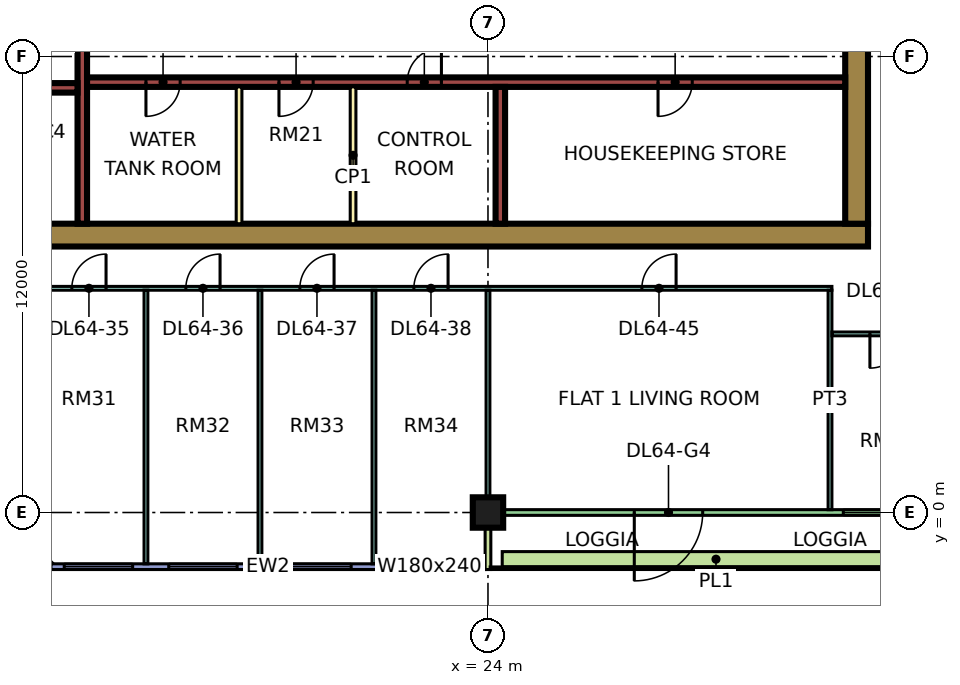
"""IFC4 building model, lengths in metres.
Left out: names, types, materials, properties, quantities, classifications, styles, units other than length and angle.
Written with IfcOpenShell. Run it as: python <this file> out.ifc"""

import sys

from ifc_helpers import new_model, si_unit, direction, frame, frame_2d, origin, origin_2d, place, context, subcontext, project, spatial, rectangle, extrude, element, fill, save


model = new_model("IFC4")
c1 = context("Model", 3, precision=1e-05, world=origin(), true_north=direction((0.0, 1.0)))
c2 = subcontext(c1, "Body", "Model", "MODEL_VIEW")
j1 = project(units=[si_unit("LENGTHUNIT", "METRE"), si_unit("PLANEANGLEUNIT", "RADIAN")], contexts=[c1])
p1 = place(None, origin())
s1 = spatial("IfcSite", under=j1, at=p1, CompositionType="ELEMENT")
p2 = place(p1, origin())
s2 = spatial("IfcBuilding", under=s1, at=p2, CompositionType="ELEMENT")
p3 = place(p2, frame((0.0, 0.0, 277.15)))
s3 = spatial("IfcBuildingStorey", under=s2, at=p3, CompositionType="ELEMENT", Elevation=277.15)
p4 = place(p3, frame((24.0, 0.0, 0.0), z_axis=(0.0, 0.0, 1.0), x_axis=(1.0, 0.0, 0.0)))
e1 = element("IfcColumn", 1, at=p4, inside=s3, PredefinedType="COLUMN", context=c2, shape_type="SweptSolid", body=[
    extrude(rectangle(XDim=0.8, YDim=0.8, at=origin_2d()), origin(), (0.0, 0.0, 1.0), 3.75),
])
p5 = place(p3, frame((9.0, 7.3, 0.0), z_axis=(0.0, 0.0, 1.0), x_axis=(1.0, 0.0, 0.0)))
e2 = element("IfcWall", 2, at=p5, inside=s3, PredefinedType="SHEAR", context=c2, shape_type="SweptSolid", body=[
    extrude(rectangle(XDim=25.0, YDim=0.6, at=frame_2d((12.5, 0.0))), origin(), (0.0, 0.0, 1.0), 3.75),
])
p6 = place(p3, frame((33.7, 7.6, 0.0), z_axis=(0.0, 0.0, 1.0), x_axis=(0.0, 1.0, 0.0)))
e3 = element("IfcWall", 3, at=p6, inside=s3, PredefinedType="SHEAR", context=c2, shape_type="SweptSolid", body=[
    extrude(rectangle(XDim=11.8, YDim=0.6, at=frame_2d((5.9, 0.0))), origin(), (0.0, 0.0, 1.0), 3.75),
])
p7 = place(p6, frame((5.6, 0.0, 0.0)))
e4 = element("IfcOpeningElement", 4, at=p7, cuts=e3, PredefinedType="OPENING", context=c2, shape_type="SweptSolid", body=[
    extrude(rectangle(XDim=1.8, YDim=2.4, at=frame_2d((0.9, 1.2))), frame((0.0, 0.31, 0.0), z_axis=(0.0, -1.0, 0.0), x_axis=(1.0, 0.0, 0.0)), (0.0, 0.0, 1.0), 0.62),
])
p8 = place(p3, frame((13.325, 7.6, 0.0), z_axis=(0.0, 0.0, 1.0), x_axis=(0.0, 1.0, 0.0)))
e5 = element("IfcWall", 5, at=p8, inside=s3, PredefinedType="SHEAR", context=c2, shape_type="SweptSolid", body=[
    extrude(rectangle(XDim=11.8, YDim=0.25, at=frame_2d((5.9, 0.0))), origin(), (0.0, 0.0, 1.0), 3.75),
])
p9 = place(p3, frame((13.45, 11.325, 0.0), z_axis=(0.0, 0.0, 1.0), x_axis=(1.0, 0.0, 0.0)))
e6 = element("IfcWall", 6, at=p9, inside=s3, PredefinedType="SHEAR", context=c2, shape_type="SweptSolid", body=[
    extrude(rectangle(XDim=19.95, YDim=0.25, at=frame_2d((9.975, 0.0))), origin(), (0.0, 0.0, 1.0), 3.75),
])
p10 = place(p9, frame((1.55, 0.0, 0.0)))
e7 = element("IfcOpeningElement", 7, at=p10, cuts=e6, PredefinedType="OPENING", context=c2, shape_type="SweptSolid", body=[
    extrude(rectangle(XDim=0.9, YDim=2.1, at=frame_2d((0.45, 1.05))), frame((0.0, 0.135, 0.0), z_axis=(0.0, -1.0, 0.0), x_axis=(1.0, 0.0, 0.0)), (0.0, 0.0, 1.0), 0.27),
])
p11 = place(p9, frame((5.05, 0.0, 0.0)))
e8 = element("IfcOpeningElement", 8, at=p11, cuts=e6, PredefinedType="OPENING", context=c2, shape_type="SweptSolid", body=[
    extrude(rectangle(XDim=0.9, YDim=2.1, at=frame_2d((0.45, 1.05))), frame((0.0, 0.135, 0.0), z_axis=(0.0, -1.0, 0.0), x_axis=(1.0, 0.0, 0.0)), (0.0, 0.0, 1.0), 0.27),
])
p12 = place(p9, frame((8.425, 0.0, 0.0)))
e9 = element("IfcOpeningElement", 9, at=p12, cuts=e6, PredefinedType="OPENING", context=c2, shape_type="SweptSolid", body=[
    extrude(rectangle(XDim=0.9, YDim=2.1, at=frame_2d((0.45, 1.05))), frame((0.0, 0.135, 0.0), z_axis=(0.0, -1.0, 0.0), x_axis=(1.0, 0.0, 0.0)), (0.0, 0.0, 1.0), 0.27),
])
p13 = place(p9, frame((15.025, 0.0, 0.0)))
e10 = element("IfcOpeningElement", 10, at=p13, cuts=e6, PredefinedType="OPENING", context=c2, shape_type="SweptSolid", body=[
    extrude(rectangle(XDim=0.9, YDim=2.1, at=frame_2d((0.45, 1.05))), frame((0.0, 0.135, 0.0), z_axis=(0.0, -1.0, 0.0), x_axis=(1.0, 0.0, 0.0)), (0.0, 0.0, 1.0), 0.27),
])
p14 = place(p3, frame((10.2, 11.175, 0.0), z_axis=(0.0, 0.0, 1.0), x_axis=(1.0, 0.0, 0.0)))
e11 = element("IfcWall", 11, at=p14, inside=s3, PredefinedType="SHEAR", context=c2, shape_type="SweptSolid", body=[
    extrude(rectangle(XDim=3.0, YDim=0.25, at=frame_2d((1.5, 0.0))), origin(), (0.0, 0.0, 1.0), 3.75),
])
p15 = place(p3, frame((24.325, 7.6, 0.0), z_axis=(0.0, 0.0, 1.0), x_axis=(0.0, 1.0, 0.0)))
e12 = element("IfcWall", 12, at=p15, inside=s3, PredefinedType="SHEAR", context=c2, shape_type="SweptSolid", body=[
    extrude(rectangle(XDim=3.6, YDim=0.25, at=frame_2d((1.8, 0.0))), origin(), (0.0, 0.0, 1.0), 3.75),
])
p16 = place(p3, frame((-1.447, 12.553, 0.0), z_axis=(0.0, 0.0, 1.0), x_axis=(0.707106781187, -0.707106781187, 0.0)))
e13 = element("IfcWall", 13, at=p16, inside=s3, PredefinedType="SOLIDWALL", context=c2, shape_type="SweptSolid", body=[
    extrude(rectangle(XDim=19.799, YDim=0.15, at=frame_2d((9.899, 0.0))), origin(), (0.0, 0.0, 1.0), 3.35),
])
p17 = place(p16, frame((2.212, 0.0, 0.45)))
e14 = element("IfcOpeningElement", 14, at=p17, cuts=e13, PredefinedType="OPENING", context=c2, shape_type="SweptSolid", body=[
    extrude(rectangle(XDim=3.0, YDim=2.4, at=frame_2d((1.5, 1.2))), frame((0.0, 0.085, 0.0), z_axis=(0.0, -1.0, 0.0), x_axis=(1.0, 0.0, 0.0)), (0.0, 0.0, 1.0), 0.17),
])
p18 = place(p16, frame((10.216, 0.0, 0.45)))
e15 = element("IfcOpeningElement", 15, at=p18, cuts=e13, PredefinedType="OPENING", context=c2, shape_type="SweptSolid", body=[
    extrude(rectangle(XDim=3.0, YDim=2.4, at=frame_2d((1.5, 1.2))), frame((0.0, 0.085, 0.0), z_axis=(0.0, -1.0, 0.0), x_axis=(1.0, 0.0, 0.0)), (0.0, 0.0, 1.0), 0.17),
])
p19 = place(p3, frame((12.5, -1.425, 0.0), z_axis=(0.0, 0.0, 1.0), x_axis=(1.0, 0.0, 0.0)))
e16 = element("IfcWall", 16, at=p19, inside=s3, PredefinedType="SOLIDWALL", context=c2, shape_type="SweptSolid", body=[
    extrude(rectangle(XDim=11.425, YDim=0.15, at=frame_2d((5.712, 0.0))), origin(), (0.0, 0.0, 1.0), 3.35),
])
p20 = place(p19, frame((0.35, 0.0, 0.45)))
e17 = element("IfcOpeningElement", 17, at=p20, cuts=e16, PredefinedType="OPENING", context=c2, shape_type="SweptSolid", body=[
    extrude(rectangle(XDim=1.8, YDim=2.4, at=frame_2d((0.9, 1.2))), frame((0.0, 0.085, 0.0), z_axis=(0.0, -1.0, 0.0), x_axis=(1.0, 0.0, 0.0)), (0.0, 0.0, 1.0), 0.17),
])
p21 = place(p19, frame((3.1, 0.0, 0.45)))
e18 = element("IfcOpeningElement", 18, at=p21, cuts=e16, PredefinedType="OPENING", context=c2, shape_type="SweptSolid", body=[
    extrude(rectangle(XDim=1.8, YDim=2.4, at=frame_2d((0.9, 1.2))), frame((0.0, 0.085, 0.0), z_axis=(0.0, -1.0, 0.0), x_axis=(1.0, 0.0, 0.0)), (0.0, 0.0, 1.0), 0.17),
])
p22 = place(p19, frame((6.1, 0.0, 0.45)))
e19 = element("IfcOpeningElement", 19, at=p22, cuts=e16, PredefinedType="OPENING", context=c2, shape_type="SweptSolid", body=[
    extrude(rectangle(XDim=1.8, YDim=2.4, at=frame_2d((0.9, 1.2))), frame((0.0, 0.085, 0.0), z_axis=(0.0, -1.0, 0.0), x_axis=(1.0, 0.0, 0.0)), (0.0, 0.0, 1.0), 0.17),
])
p23 = place(p19, frame((9.062, 0.0, 0.45)))
e20 = element("IfcOpeningElement", 20, at=p23, cuts=e16, PredefinedType="OPENING", context=c2, shape_type="SweptSolid", body=[
    extrude(rectangle(XDim=1.8, YDim=2.4, at=frame_2d((0.9, 1.2))), frame((0.0, 0.085, 0.0), z_axis=(0.0, -1.0, 0.0), x_axis=(1.0, 0.0, 0.0)), (0.0, 0.0, 1.0), 0.17),
])
p24 = place(p3, frame((24.075, 0.0, 0.0), z_axis=(0.0, 0.0, 1.0), x_axis=(1.0, 0.0, 0.0)))
e21 = element("IfcWall", 21, at=p24, inside=s3, PredefinedType="SOLIDWALL", context=c2, shape_type="SweptSolid", body=[
    extrude(rectangle(XDim=11.85, YDim=0.15, at=frame_2d((5.925, 0.0))), origin(), (0.0, 0.0, 1.0), 3.35),
])
p25 = place(p24, frame((3.775, 0.0, 0.0)))
e22 = element("IfcOpeningElement", 22, at=p25, cuts=e21, PredefinedType="OPENING", context=c2, shape_type="SweptSolid", body=[
    extrude(rectangle(XDim=1.8, YDim=2.4, at=frame_2d((0.9, 1.2))), frame((0.0, 0.085, 0.0), z_axis=(0.0, -1.0, 0.0), x_axis=(1.0, 0.0, 0.0)), (0.0, 0.0, 1.0), 0.17),
])
p26 = place(p24, frame((9.275, 0.0, 0.45)))
e23 = element("IfcOpeningElement", 23, at=p26, cuts=e21, PredefinedType="OPENING", context=c2, shape_type="SweptSolid", body=[
    extrude(rectangle(XDim=1.8, YDim=2.4, at=frame_2d((0.9, 1.2))), frame((0.0, 0.085, 0.0), z_axis=(0.0, -1.0, 0.0), x_axis=(1.0, 0.0, 0.0)), (0.0, 0.0, 1.0), 0.17),
])
p27 = place(p3, frame((24.0, -1.5, 0.0), z_axis=(0.0, 0.0, 1.0), x_axis=(0.0, 1.0, 0.0)))
e24 = element("IfcWall", 24, at=p27, inside=s3, PredefinedType="SOLIDWALL", context=c2, shape_type="SweptSolid", body=[
    extrude(rectangle(XDim=1.5, YDim=0.15, at=frame_2d((0.75, 0.0))), origin(), (0.0, 0.0, 1.0), 3.35),
])
p28 = place(p3, frame((24.375, -1.229, 0.0), z_axis=(0.0, 0.0, 1.0), x_axis=(1.0, 0.0, 0.0)))
e25 = element("IfcWall", 25, at=p28, inside=s3, PredefinedType="SOLIDWALL", context=c2, shape_type="SweptSolid", body=[
    extrude(rectangle(XDim=11.25, YDim=0.4, at=frame_2d((5.625, 0.0))), origin(), (0.0, 0.0, 1.0), 0.7),
])
for number, where, z_axis, x_axis in (
    (26, (17.45, 7.6, 0.0), (0.0, 0.0, 1.0), (0.0, 1.0, 0.0)),
    (27, (20.45, 7.6, 0.0), (0.0, 0.0, 1.0), (0.0, 1.0, 0.0)),
):
    element("IfcWall", number, at=place(p3, frame(where, z_axis=z_axis, x_axis=x_axis)), inside=s3, PredefinedType="PARTITIONING", context=c2, shape_type="SweptSolid", body=[
        extrude(rectangle(XDim=3.6, YDim=0.15, at=frame_2d((1.8, 0.0))), origin(), (0.0, 0.0, 1.0), 3.35),
    ])
p29 = place(p3, frame((11.95, 5.9, 0.0), z_axis=(0.0, 0.0, 1.0), x_axis=(1.0, 0.0, 0.0)))
e28 = element("IfcWall", 28, at=p29, inside=s3, PredefinedType="PARTITIONING", context=c2, shape_type="SweptSolid", body=[
    extrude(rectangle(XDim=21.1, YDim=0.1, at=frame_2d((10.55, 0.0))), origin(), (0.0, 0.0, 1.0), 3.35),
])
p30 = place(p29, frame((1.1, 0.0, 0.0)))
e29 = element("IfcOpeningElement", 29, at=p30, cuts=e28, PredefinedType="OPENING", context=c2, shape_type="SweptSolid", body=[
    extrude(rectangle(XDim=0.9, YDim=2.1, at=frame_2d((0.45, 1.05))), frame((0.0, 0.06, 0.0), z_axis=(0.0, -1.0, 0.0), x_axis=(1.0, 0.0, 0.0)), (0.0, 0.0, 1.0), 0.12),
])
p31 = place(p29, frame((4.1, 0.0, 0.0)))
e30 = element("IfcOpeningElement", 30, at=p31, cuts=e28, PredefinedType="OPENING", context=c2, shape_type="SweptSolid", body=[
    extrude(rectangle(XDim=0.9, YDim=2.1, at=frame_2d((0.45, 1.05))), frame((0.0, 0.06, 0.0), z_axis=(0.0, -1.0, 0.0), x_axis=(1.0, 0.0, 0.0)), (0.0, 0.0, 1.0), 0.12),
])
p32 = place(p29, frame((7.1, 0.0, 0.0)))
e31 = element("IfcOpeningElement", 31, at=p32, cuts=e28, PredefinedType="OPENING", context=c2, shape_type="SweptSolid", body=[
    extrude(rectangle(XDim=0.9, YDim=2.1, at=frame_2d((0.45, 1.05))), frame((0.0, 0.06, 0.0), z_axis=(0.0, -1.0, 0.0), x_axis=(1.0, 0.0, 0.0)), (0.0, 0.0, 1.0), 0.12),
])
p33 = place(p29, frame((10.1, 0.0, 0.0)))
e32 = element("IfcOpeningElement", 32, at=p33, cuts=e28, PredefinedType="OPENING", context=c2, shape_type="SweptSolid", body=[
    extrude(rectangle(XDim=0.9, YDim=2.1, at=frame_2d((0.45, 1.05))), frame((0.0, 0.06, 0.0), z_axis=(0.0, -1.0, 0.0), x_axis=(1.0, 0.0, 0.0)), (0.0, 0.0, 1.0), 0.12),
])
p34 = place(p29, frame((16.1, 0.0, 0.0)))
e33 = element("IfcOpeningElement", 33, at=p34, cuts=e28, PredefinedType="OPENING", context=c2, shape_type="SweptSolid", body=[
    extrude(rectangle(XDim=0.9, YDim=2.1, at=frame_2d((0.45, 1.05))), frame((0.0, 0.06, 0.0), z_axis=(0.0, -1.0, 0.0), x_axis=(1.0, 0.0, 0.0)), (0.0, 0.0, 1.0), 0.12),
])
for number, where, z_axis, x_axis in (
    (34, (15.0, -1.351, 0.0), (0.0, 0.0, 1.0), (0.0, 1.0, 0.0)),
    (35, (18.0, -1.351, 0.0), (0.0, 0.0, 1.0), (0.0, 1.0, 0.0)),
    (36, (21.0, -1.351, 0.0), (0.0, 0.0, 1.0), (0.0, 1.0, 0.0)),
):
    element("IfcWall", number, at=place(p3, frame(where, z_axis=z_axis, x_axis=x_axis)), inside=s3, PredefinedType="PARTITIONING", context=c2, shape_type="SweptSolid", body=[
        extrude(rectangle(XDim=7.201, YDim=0.1, at=frame_2d((3.601, 0.0))), origin(), (0.0, 0.0, 1.0), 3.35),
    ])
p35 = place(p3, frame((24.0, 0.0, 0.0), z_axis=(0.0, 0.0, 1.0), x_axis=(0.0, 1.0, 0.0)))
e37 = element("IfcWall", 37, at=p35, inside=s3, PredefinedType="PARTITIONING", context=c2, shape_type="SweptSolid", body=[
    extrude(rectangle(XDim=5.85, YDim=0.1, at=frame_2d((2.925, 0.0))), origin(), (0.0, 0.0, 1.0), 3.35),
])
p36 = place(p3, frame((33.0, 0.074, 0.0), z_axis=(0.0, 0.0, 1.0), x_axis=(0.0, 1.0, 0.0)))
e38 = element("IfcWall", 38, at=p36, inside=s3, PredefinedType="PARTITIONING", context=c2, shape_type="SweptSolid", body=[
    extrude(rectangle(XDim=5.776, YDim=0.1, at=frame_2d((2.888, 0.0))), origin(), (0.0, 0.0, 1.0), 3.35),
])
p37 = place(p3, frame((33.05, 4.7, 0.0), z_axis=(0.0, 0.0, 1.0), x_axis=(1.0, 0.0, 0.0)))
e39 = element("IfcWall", 39, at=p37, inside=s3, PredefinedType="PARTITIONING", context=c2, shape_type="SweptSolid", body=[
    extrude(rectangle(XDim=14.85, YDim=0.1, at=frame_2d((7.425, 0.0))), origin(), (0.0, 0.0, 1.0), 3.35),
])
p38 = place(p37, frame((1.0, 0.0, 0.0)))
e40 = element("IfcOpeningElement", 40, at=p38, cuts=e39, PredefinedType="OPENING", context=c2, shape_type="SweptSolid", body=[
    extrude(rectangle(XDim=0.9, YDim=2.1, at=frame_2d((0.45, 1.05))), frame((0.0, 0.06, 0.0), z_axis=(0.0, -1.0, 0.0), x_axis=(1.0, 0.0, 0.0)), (0.0, 0.0, 1.0), 0.12),
])
p39 = place(p37, frame((4.0, 0.0, 0.0)))
e41 = element("IfcOpeningElement", 41, at=p39, cuts=e39, PredefinedType="OPENING", context=c2, shape_type="SweptSolid", body=[
    extrude(rectangle(XDim=0.9, YDim=2.1, at=frame_2d((0.45, 1.05))), frame((0.0, 0.06, 0.0), z_axis=(0.0, -1.0, 0.0), x_axis=(1.0, 0.0, 0.0)), (0.0, 0.0, 1.0), 0.12),
])
p40 = place(p37, frame((10.0, 0.0, 0.0)))
e42 = element("IfcOpeningElement", 42, at=p40, cuts=e39, PredefinedType="OPENING", context=c2, shape_type="SweptSolid", body=[
    extrude(rectangle(XDim=0.9, YDim=2.1, at=frame_2d((0.45, 1.05))), frame((0.0, 0.06, 0.0), z_axis=(0.0, -1.0, 0.0), x_axis=(1.0, 0.0, 0.0)), (0.0, 0.0, 1.0), 0.12),
])
p41 = place(p20, origin())
e43 = element("IfcWindow", 43, at=p41, inside=s3, PartitioningType="SINGLE_PANEL", PredefinedType="WINDOW", context=c2, shape_type="SweptSolid", body=[
    extrude(rectangle(XDim=1.8, YDim=2.4, at=frame_2d((0.9, 1.2))), frame((0.0, 0.03, 0.0), z_axis=(0.0, -1.0, 0.0), x_axis=(1.0, 0.0, 0.0)), (0.0, 0.0, 1.0), 0.06),
])
fill(e17, e43)
p42 = place(p21, origin())
e44 = element("IfcWindow", 44, at=p42, inside=s3, PartitioningType="SINGLE_PANEL", PredefinedType="WINDOW", context=c2, shape_type="SweptSolid", body=[
    extrude(rectangle(XDim=1.8, YDim=2.4, at=frame_2d((0.9, 1.2))), frame((0.0, 0.03, 0.0), z_axis=(0.0, -1.0, 0.0), x_axis=(1.0, 0.0, 0.0)), (0.0, 0.0, 1.0), 0.06),
])
fill(e18, e44)
p43 = place(p22, origin())
e45 = element("IfcWindow", 45, at=p43, inside=s3, PartitioningType="SINGLE_PANEL", PredefinedType="WINDOW", context=c2, shape_type="SweptSolid", body=[
    extrude(rectangle(XDim=1.8, YDim=2.4, at=frame_2d((0.9, 1.2))), frame((0.0, 0.03, 0.0), z_axis=(0.0, -1.0, 0.0), x_axis=(1.0, 0.0, 0.0)), (0.0, 0.0, 1.0), 0.06),
])
fill(e19, e45)
p44 = place(p23, origin())
e46 = element("IfcWindow", 46, at=p44, inside=s3, PartitioningType="SINGLE_PANEL", PredefinedType="WINDOW", context=c2, shape_type="SweptSolid", body=[
    extrude(rectangle(XDim=1.8, YDim=2.4, at=frame_2d((0.9, 1.2))), frame((0.0, 0.03, 0.0), z_axis=(0.0, -1.0, 0.0), x_axis=(1.0, 0.0, 0.0)), (0.0, 0.0, 1.0), 0.06),
])
fill(e20, e46)
p45 = place(p25, frame((1.8, 0.0, 0.0), z_axis=(0.0, 0.0, 1.0), x_axis=(-1.0, 0.0, 0.0)))
e47 = element("IfcDoor", 47, at=p45, inside=s3, OperationType="DOUBLE_DOOR_SINGLE_SWING", PredefinedType="DOOR", context=c2, shape_type="SweptSolid", body=[
    extrude(rectangle(XDim=1.8, YDim=2.4, at=frame_2d((0.9, 1.2))), frame((0.0, 0.025, 0.0), z_axis=(0.0, -1.0, 0.0), x_axis=(1.0, 0.0, 0.0)), (0.0, 0.0, 1.0), 0.05),
])
fill(e22, e47)
p46 = place(p26, origin())
e48 = element("IfcWindow", 48, at=p46, inside=s3, PartitioningType="SINGLE_PANEL", PredefinedType="WINDOW", context=c2, shape_type="SweptSolid", body=[
    extrude(rectangle(XDim=1.8, YDim=2.4, at=frame_2d((0.9, 1.2))), frame((0.0, 0.03, 0.0), z_axis=(0.0, -1.0, 0.0), x_axis=(1.0, 0.0, 0.0)), (0.0, 0.0, 1.0), 0.06),
])
fill(e23, e48)
p47 = place(p10, frame((0.9, 0.0, 0.0), z_axis=(0.0, 0.0, 1.0), x_axis=(-1.0, 0.0, 0.0)))
e49 = element("IfcDoor", 49, at=p47, inside=s3, OperationType="SINGLE_SWING_LEFT", PredefinedType="DOOR", context=c2, shape_type="SweptSolid", body=[
    extrude(rectangle(XDim=0.9, YDim=2.1, at=frame_2d((0.45, 1.05))), frame((0.0, 0.025, 0.0), z_axis=(0.0, -1.0, 0.0), x_axis=(1.0, 0.0, 0.0)), (0.0, 0.0, 1.0), 0.05),
])
fill(e7, e49)
p48 = place(p11, frame((0.9, 0.0, 0.0), z_axis=(0.0, 0.0, 1.0), x_axis=(-1.0, 0.0, 0.0)))
e50 = element("IfcDoor", 50, at=p48, inside=s3, OperationType="SINGLE_SWING_LEFT", PredefinedType="DOOR", context=c2, shape_type="SweptSolid", body=[
    extrude(rectangle(XDim=0.9, YDim=2.1, at=frame_2d((0.45, 1.05))), frame((0.0, 0.025, 0.0), z_axis=(0.0, -1.0, 0.0), x_axis=(1.0, 0.0, 0.0)), (0.0, 0.0, 1.0), 0.05),
])
fill(e8, e50)
p49 = place(p12, frame((0.9, 0.0, 0.0), z_axis=(0.0, 0.0, 1.0), x_axis=(-1.0, 0.0, 0.0)))
e51 = element("IfcDoor", 51, at=p49, inside=s3, OperationType="SINGLE_SWING_RIGHT", PredefinedType="DOOR", context=c2, shape_type="SweptSolid", body=[
    extrude(rectangle(XDim=0.9, YDim=2.1, at=frame_2d((0.45, 1.05))), frame((0.0, 0.025, 0.0), z_axis=(0.0, -1.0, 0.0), x_axis=(1.0, 0.0, 0.0)), (0.0, 0.0, 1.0), 0.05),
])
fill(e9, e51)
p50 = place(p13, frame((0.9, 0.0, 0.0), z_axis=(0.0, 0.0, 1.0), x_axis=(-1.0, 0.0, 0.0)))
e52 = element("IfcDoor", 52, at=p50, inside=s3, OperationType="SINGLE_SWING_LEFT", PredefinedType="DOOR", context=c2, shape_type="SweptSolid", body=[
    extrude(rectangle(XDim=0.9, YDim=2.1, at=frame_2d((0.45, 1.05))), frame((0.0, 0.025, 0.0), z_axis=(0.0, -1.0, 0.0), x_axis=(1.0, 0.0, 0.0)), (0.0, 0.0, 1.0), 0.05),
])
fill(e10, e52)
p51 = place(p30, frame((0.9, 0.0, 0.0), z_axis=(0.0, 0.0, 1.0), x_axis=(-1.0, 0.0, 0.0)))
e53 = element("IfcDoor", 53, at=p51, inside=s3, OperationType="SINGLE_SWING_RIGHT", PredefinedType="DOOR", context=c2, shape_type="SweptSolid", body=[
    extrude(rectangle(XDim=0.9, YDim=2.1, at=frame_2d((0.45, 1.05))), frame((0.0, 0.025, 0.0), z_axis=(0.0, -1.0, 0.0), x_axis=(1.0, 0.0, 0.0)), (0.0, 0.0, 1.0), 0.05),
])
fill(e29, e53)
p52 = place(p31, frame((0.9, 0.0, 0.0), z_axis=(0.0, 0.0, 1.0), x_axis=(-1.0, 0.0, 0.0)))
e54 = element("IfcDoor", 54, at=p52, inside=s3, OperationType="SINGLE_SWING_RIGHT", PredefinedType="DOOR", context=c2, shape_type="SweptSolid", body=[
    extrude(rectangle(XDim=0.9, YDim=2.1, at=frame_2d((0.45, 1.05))), frame((0.0, 0.025, 0.0), z_axis=(0.0, -1.0, 0.0), x_axis=(1.0, 0.0, 0.0)), (0.0, 0.0, 1.0), 0.05),
])
fill(e30, e54)
p53 = place(p32, frame((0.9, 0.0, 0.0), z_axis=(0.0, 0.0, 1.0), x_axis=(-1.0, 0.0, 0.0)))
e55 = element("IfcDoor", 55, at=p53, inside=s3, OperationType="SINGLE_SWING_RIGHT", PredefinedType="DOOR", context=c2, shape_type="SweptSolid", body=[
    extrude(rectangle(XDim=0.9, YDim=2.1, at=frame_2d((0.45, 1.05))), frame((0.0, 0.025, 0.0), z_axis=(0.0, -1.0, 0.0), x_axis=(1.0, 0.0, 0.0)), (0.0, 0.0, 1.0), 0.05),
])
fill(e31, e55)
p54 = place(p33, frame((0.9, 0.0, 0.0), z_axis=(0.0, 0.0, 1.0), x_axis=(-1.0, 0.0, 0.0)))
e56 = element("IfcDoor", 56, at=p54, inside=s3, OperationType="SINGLE_SWING_RIGHT", PredefinedType="DOOR", context=c2, shape_type="SweptSolid", body=[
    extrude(rectangle(XDim=0.9, YDim=2.1, at=frame_2d((0.45, 1.05))), frame((0.0, 0.025, 0.0), z_axis=(0.0, -1.0, 0.0), x_axis=(1.0, 0.0, 0.0)), (0.0, 0.0, 1.0), 0.05),
])
fill(e32, e56)
p55 = place(p38, frame((0.9, 0.0, 0.0), z_axis=(0.0, 0.0, 1.0), x_axis=(-1.0, 0.0, 0.0)))
e57 = element("IfcDoor", 57, at=p55, inside=s3, OperationType="SINGLE_SWING_LEFT", PredefinedType="DOOR", context=c2, shape_type="SweptSolid", body=[
    extrude(rectangle(XDim=0.9, YDim=2.1, at=frame_2d((0.45, 1.05))), frame((0.0, 0.025, 0.0), z_axis=(0.0, -1.0, 0.0), x_axis=(1.0, 0.0, 0.0)), (0.0, 0.0, 1.0), 0.05),
])
fill(e40, e57)
p56 = place(p34, frame((0.9, 0.0, 0.0), z_axis=(0.0, 0.0, 1.0), x_axis=(-1.0, 0.0, 0.0)))
e58 = element("IfcDoor", 58, at=p56, inside=s3, OperationType="SINGLE_SWING_RIGHT", PredefinedType="DOOR", context=c2, shape_type="SweptSolid", body=[
    extrude(rectangle(XDim=0.9, YDim=2.1, at=frame_2d((0.45, 1.05))), frame((0.0, 0.025, 0.0), z_axis=(0.0, -1.0, 0.0), x_axis=(1.0, 0.0, 0.0)), (0.0, 0.0, 1.0), 0.05),
])
fill(e33, e58)
save(model, sys.argv[1])
